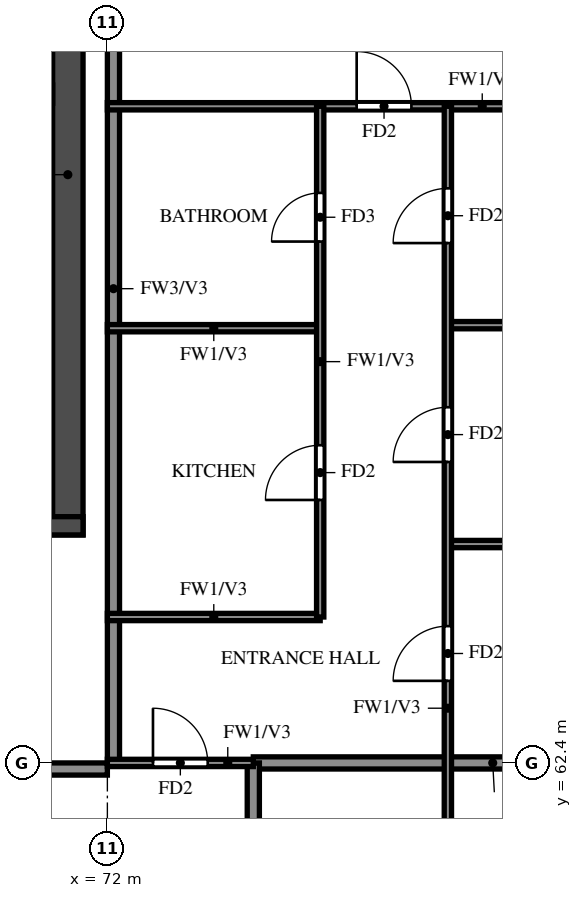
"""IFC4 building model, lengths in metres.
Left out: names, types, materials, properties, quantities, classifications, styles, units other than length and angle.
Written with IfcOpenShell. Run it as: python <this file> out.ifc"""

import sys

from ifc_helpers import new_model, si_unit, direction, frame, frame_2d, origin, place, context, subcontext, project, spatial, rectangle, extrude, element, fill, save


model = new_model("IFC4")
c1 = context("Model", 3, precision=1e-05, world=origin(), true_north=direction((0.0, 1.0)))
c2 = subcontext(c1, "Body", "Model", "MODEL_VIEW")
j1 = project(units=[si_unit("LENGTHUNIT", "METRE"), si_unit("PLANEANGLEUNIT", "RADIAN")], contexts=[c1])
p1 = place(None, origin())
s1 = spatial("IfcSite", under=j1, at=p1, CompositionType="ELEMENT")
p2 = place(p1, origin())
s2 = spatial("IfcBuilding", under=s1, at=p2, CompositionType="ELEMENT")
p3 = place(p2, frame((0.0, 0.0, 225.5)))
s3 = spatial("IfcBuildingStorey", under=s2, at=p3, CompositionType="ELEMENT", Elevation=225.5)
p4 = place(p3, frame((71.35, 66.15, 0.0), z_axis=(0.0, 0.0, 1.0), x_axis=(0.0, 1.0, 0.0)))
e1 = element("IfcWall", 1, at=p4, inside=s3, PredefinedType="SHEAR", context=c2, shape_type="SweptSolid", body=[
    extrude(rectangle(XDim=11.85, YDim=0.5, at=frame_2d((5.925, 0.0))), origin(), (0.0, 0.0, 1.0), 3.22),
])
p5 = place(p3, frame((29.2, 66.3, 0.0), z_axis=(0.0, 0.0, 1.0), x_axis=(1.0, 0.0, 0.0)))
e2 = element("IfcWall", 2, at=p5, inside=s3, PredefinedType="SHEAR", context=c2, shape_type="SweptSolid", body=[
    extrude(rectangle(XDim=42.4, YDim=0.3, at=frame_2d((21.2, 0.0))), origin(), (0.0, 0.0, 1.0), 3.22),
])
p6 = place(p5, frame((1.425, 0.0, 0.0)))
e3 = element("IfcOpeningElement", 3, at=p6, cuts=e2, PredefinedType="OPENING", context=c2, shape_type="SweptSolid", body=[
    extrude(rectangle(XDim=1.1, YDim=2.1, at=frame_2d((0.55, 1.05))), frame((0.0, 0.16, 0.0), z_axis=(0.0, -1.0, 0.0), x_axis=(1.0, 0.0, 0.0)), (0.0, 0.0, 1.0), 0.32),
])
p7 = place(p5, frame((4.2, 0.0, 0.0)))
e4 = element("IfcOpeningElement", 4, at=p7, cuts=e2, PredefinedType="OPENING", context=c2, shape_type="SweptSolid", body=[
    extrude(rectangle(XDim=1.8, YDim=2.1, at=frame_2d((0.9, 1.05))), frame((0.0, 0.16, 0.0), z_axis=(0.0, -1.0, 0.0), x_axis=(1.0, 0.0, 0.0)), (0.0, 0.0, 1.0), 0.32),
])
p8 = place(p3, frame((67.2, 62.3, 0.0), z_axis=(0.0, 0.0, 1.0), x_axis=(1.0, 0.0, 0.0)))
e5 = element("IfcWall", 5, at=p8, inside=s3, PredefinedType="SOLIDWALL", context=c2, shape_type="SweptSolid", body=[
    extrude(rectangle(XDim=4.8, YDim=0.2, at=frame_2d((2.4, 0.0))), origin(), (0.0, 0.0, 1.0), 3.22),
])
p9 = place(p3, frame((72.1, 62.4, 0.0), z_axis=(0.0, 0.0, 1.0), x_axis=(0.0, 1.0, 0.0)))
e6 = element("IfcWall", 6, at=p9, inside=s3, PredefinedType="SOLIDWALL", context=c2, shape_type="SweptSolid", body=[
    extrude(rectangle(XDim=15.6, YDim=0.2, at=frame_2d((7.8, 0.0))), origin(), (0.0, 0.0, 1.0), 3.22),
])
p10 = place(p3, frame((74.4, 62.4, 0.0), z_axis=(0.0, 0.0, 1.0), x_axis=(1.0, 0.0, 0.0)))
e7 = element("IfcWall", 7, at=p10, inside=s3, PredefinedType="SOLIDWALL", context=c2, shape_type="SweptSolid", body=[
    extrude(rectangle(XDim=7.875, YDim=0.2, at=frame_2d((3.938, 0.0))), origin(), (0.0, 0.0, 1.0), 3.22),
])
p11 = place(p3, frame((74.4, 60.0, 0.0), z_axis=(0.0, 0.0, 1.0), x_axis=(0.0, 1.0, 0.0)))
e8 = element("IfcWall", 8, at=p11, inside=s3, PredefinedType="SOLIDWALL", context=c2, shape_type="SweptSolid", body=[
    extrude(rectangle(XDim=2.4, YDim=0.2, at=frame_2d((1.2, 0.0))), origin(), (0.0, 0.0, 1.0), 3.22),
])
p12 = place(p3, frame((72.0, 62.4, 0.0), z_axis=(0.0, 0.0, 1.0), x_axis=(1.0, 0.0, 0.0)))
e9 = element("IfcWall", 9, at=p12, inside=s3, PredefinedType="PARTITIONING", context=c2, shape_type="SweptSolid", body=[
    extrude(rectangle(XDim=2.4, YDim=0.12, at=frame_2d((1.2, 0.0))), origin(), (0.0, 0.0, 1.0), 3.22),
])
p13 = place(p12, frame((0.75, 0.0, 0.0)))
e10 = element("IfcOpeningElement", 10, at=p13, cuts=e9, PredefinedType="OPENING", context=c2, shape_type="SweptSolid", body=[
    extrude(rectangle(XDim=0.9, YDim=2.1, at=frame_2d((0.45, 1.05))), frame((0.0, 0.07, 0.0), z_axis=(0.0, -1.0, 0.0), x_axis=(1.0, 0.0, 0.0)), (0.0, 0.0, 1.0), 0.14),
])
p14 = place(p3, frame((72.0, 64.8, 0.0), z_axis=(0.0, 0.0, 1.0), x_axis=(1.0, 0.0, 0.0)))
e11 = element("IfcWall", 11, at=p14, inside=s3, PredefinedType="PARTITIONING", context=c2, shape_type="SweptSolid", body=[
    extrude(rectangle(XDim=3.5, YDim=0.12, at=frame_2d((1.75, 0.0))), origin(), (0.0, 0.0, 1.0), 3.22),
])
p15 = place(p3, frame((77.6, 66.0, 0.0), z_axis=(0.0, 0.0, 1.0), x_axis=(1.0, 0.0, 0.0)))
e12 = element("IfcWall", 12, at=p15, inside=s3, PredefinedType="PARTITIONING", context=c2, shape_type="SweptSolid", body=[
    extrude(rectangle(XDim=4.675, YDim=0.12, at=frame_2d((2.337, 0.0))), origin(), (0.0, 0.0, 1.0), 2.32),
])
p16 = place(p3, frame((72.0, 69.55, 0.0), z_axis=(0.0, 0.0, 1.0), x_axis=(1.0, 0.0, 0.0)))
e13 = element("IfcWall", 13, at=p16, inside=s3, PredefinedType="PARTITIONING", context=c2, shape_type="SweptSolid", body=[
    extrude(rectangle(XDim=3.5, YDim=0.12, at=frame_2d((1.75, 0.0))), origin(), (0.0, 0.0, 1.0), 3.22),
])
p17 = place(p3, frame((77.6, 69.6, 0.0), z_axis=(0.0, 0.0, 1.0), x_axis=(1.0, 0.0, 0.0)))
e14 = element("IfcWall", 14, at=p17, inside=s3, PredefinedType="PARTITIONING", context=c2, shape_type="SweptSolid", body=[
    extrude(rectangle(XDim=4.675, YDim=0.12, at=frame_2d((2.337, 0.0))), origin(), (0.0, 0.0, 1.0), 3.22),
])
p18 = place(p3, frame((72.0, 73.2, 0.0), z_axis=(0.0, 0.0, 1.0), x_axis=(1.0, 0.0, 0.0)))
e15 = element("IfcWall", 15, at=p18, inside=s3, PredefinedType="PARTITIONING", context=c2, shape_type="SweptSolid", body=[
    extrude(rectangle(XDim=10.275, YDim=0.12, at=frame_2d((5.137, 0.0))), origin(), (0.0, 0.0, 1.0), 2.32),
])
p19 = place(p18, frame((4.1, 0.0, 0.0)))
e16 = element("IfcOpeningElement", 16, at=p19, cuts=e15, PredefinedType="OPENING", context=c2, shape_type="SweptSolid", body=[
    extrude(rectangle(XDim=0.9, YDim=2.1, at=frame_2d((0.45, 1.05))), frame((0.0, 0.07, 0.0), z_axis=(0.0, -1.0, 0.0), x_axis=(1.0, 0.0, 0.0)), (0.0, 0.0, 1.0), 0.14),
])
p20 = place(p3, frame((75.5, 64.8, 0.0), z_axis=(0.0, 0.0, 1.0), x_axis=(0.0, 1.0, 0.0)))
e17 = element("IfcWall", 17, at=p20, inside=s3, PredefinedType="PARTITIONING", context=c2, shape_type="SweptSolid", body=[
    extrude(rectangle(XDim=8.4, YDim=0.12, at=frame_2d((4.2, 0.0))), origin(), (0.0, 0.0, 1.0), 3.22),
])
p21 = place(p20, frame((1.925, 0.0, 0.0)))
e18 = element("IfcOpeningElement", 18, at=p21, cuts=e17, PredefinedType="OPENING", context=c2, shape_type="SweptSolid", body=[
    extrude(rectangle(XDim=0.9, YDim=2.1, at=frame_2d((0.45, 1.05))), frame((0.0, 0.07, 0.0), z_axis=(0.0, -1.0, 0.0), x_axis=(1.0, 0.0, 0.0)), (0.0, 0.0, 1.0), 0.14),
])
p22 = place(p20, frame((6.175, 0.0, 0.0)))
e19 = element("IfcOpeningElement", 19, at=p22, cuts=e17, PredefinedType="OPENING", context=c2, shape_type="SweptSolid", body=[
    extrude(rectangle(XDim=0.8, YDim=2.1, at=frame_2d((0.4, 1.05))), frame((0.0, 0.07, 0.0), z_axis=(0.0, -1.0, 0.0), x_axis=(1.0, 0.0, 0.0)), (0.0, 0.0, 1.0), 0.14),
])
p23 = place(p3, frame((77.6, 55.2, 0.0), z_axis=(0.0, 0.0, 1.0), x_axis=(0.0, 1.0, 0.0)))
e20 = element("IfcWall", 20, at=p23, inside=s3, PredefinedType="PARTITIONING", context=c2, shape_type="SweptSolid", body=[
    extrude(rectangle(XDim=18.0, YDim=0.12, at=frame_2d((9.0, 0.0))), origin(), (0.0, 0.0, 1.0), 3.22),
])
p24 = place(p23, frame((2.85, 0.0, 0.0)))
e21 = element("IfcOpeningElement", 21, at=p24, cuts=e20, PredefinedType="OPENING", context=c2, shape_type="SweptSolid", body=[
    extrude(rectangle(XDim=1.5, YDim=2.1, at=frame_2d((0.75, 1.05))), frame((0.0, 0.07, 0.0), z_axis=(0.0, -1.0, 0.0), x_axis=(1.0, 0.0, 0.0)), (0.0, 0.0, 1.0), 0.14),
])
p25 = place(p23, frame((8.55, 0.0, 0.0)))
e22 = element("IfcOpeningElement", 22, at=p25, cuts=e20, PredefinedType="OPENING", context=c2, shape_type="SweptSolid", body=[
    extrude(rectangle(XDim=0.9, YDim=2.1, at=frame_2d((0.45, 1.05))), frame((0.0, 0.07, 0.0), z_axis=(0.0, -1.0, 0.0), x_axis=(1.0, 0.0, 0.0)), (0.0, 0.0, 1.0), 0.14),
])
p26 = place(p23, frame((12.15, 0.0, 0.0)))
e23 = element("IfcOpeningElement", 23, at=p26, cuts=e20, PredefinedType="OPENING", context=c2, shape_type="SweptSolid", body=[
    extrude(rectangle(XDim=0.9, YDim=2.1, at=frame_2d((0.45, 1.05))), frame((0.0, 0.07, 0.0), z_axis=(0.0, -1.0, 0.0), x_axis=(1.0, 0.0, 0.0)), (0.0, 0.0, 1.0), 0.14),
])
p27 = place(p23, frame((15.75, 0.0, 0.0)))
e24 = element("IfcOpeningElement", 24, at=p27, cuts=e20, PredefinedType="OPENING", context=c2, shape_type="SweptSolid", body=[
    extrude(rectangle(XDim=0.9, YDim=2.1, at=frame_2d((0.45, 1.05))), frame((0.0, 0.07, 0.0), z_axis=(0.0, -1.0, 0.0), x_axis=(1.0, 0.0, 0.0)), (0.0, 0.0, 1.0), 0.14),
])
p28 = place(p13, origin())
e25 = element("IfcDoor", 25, at=p28, inside=s3, OperationType="SINGLE_SWING_LEFT", PredefinedType="DOOR", context=c2, shape_type="SweptSolid", body=[
    extrude(rectangle(XDim=0.9, YDim=2.1, at=frame_2d((0.45, 1.05))), frame((0.0, 0.025, 0.0), z_axis=(0.0, -1.0, 0.0), x_axis=(1.0, 0.0, 0.0)), (0.0, 0.0, 1.0), 0.05),
])
fill(e10, e25)
p29 = place(p25, origin())
e26 = element("IfcDoor", 26, at=p29, inside=s3, OperationType="SINGLE_SWING_RIGHT", PredefinedType="DOOR", context=c2, shape_type="SweptSolid", body=[
    extrude(rectangle(XDim=0.9, YDim=2.1, at=frame_2d((0.45, 1.05))), frame((0.0, 0.025, 0.0), z_axis=(0.0, -1.0, 0.0), x_axis=(1.0, 0.0, 0.0)), (0.0, 0.0, 1.0), 0.05),
])
fill(e22, e26)
p30 = place(p26, origin())
e27 = element("IfcDoor", 27, at=p30, inside=s3, OperationType="SINGLE_SWING_LEFT", PredefinedType="DOOR", context=c2, shape_type="SweptSolid", body=[
    extrude(rectangle(XDim=0.9, YDim=2.1, at=frame_2d((0.45, 1.05))), frame((0.0, 0.025, 0.0), z_axis=(0.0, -1.0, 0.0), x_axis=(1.0, 0.0, 0.0)), (0.0, 0.0, 1.0), 0.05),
])
fill(e23, e27)
p31 = place(p27, origin())
e28 = element("IfcDoor", 28, at=p31, inside=s3, OperationType="SINGLE_SWING_LEFT", PredefinedType="DOOR", context=c2, shape_type="SweptSolid", body=[
    extrude(rectangle(XDim=0.9, YDim=2.1, at=frame_2d((0.45, 1.05))), frame((0.0, 0.025, 0.0), z_axis=(0.0, -1.0, 0.0), x_axis=(1.0, 0.0, 0.0)), (0.0, 0.0, 1.0), 0.05),
])
fill(e24, e28)
p32 = place(p19, origin())
e29 = element("IfcDoor", 29, at=p32, inside=s3, OperationType="SINGLE_SWING_RIGHT", PredefinedType="DOOR", context=c2, shape_type="SweptSolid", body=[
    extrude(rectangle(XDim=0.9, YDim=2.1, at=frame_2d((0.45, 1.05))), frame((0.0, 0.025, 0.0), z_axis=(0.0, -1.0, 0.0), x_axis=(1.0, 0.0, 0.0)), (0.0, 0.0, 1.0), 0.05),
])
fill(e16, e29)
p33 = place(p21, origin())
e30 = element("IfcDoor", 30, at=p33, inside=s3, OperationType="SINGLE_SWING_LEFT", PredefinedType="DOOR", context=c2, shape_type="SweptSolid", body=[
    extrude(rectangle(XDim=0.9, YDim=2.1, at=frame_2d((0.45, 1.05))), frame((0.0, 0.025, 0.0), z_axis=(0.0, -1.0, 0.0), x_axis=(1.0, 0.0, 0.0)), (0.0, 0.0, 1.0), 0.05),
])
fill(e18, e30)
p34 = place(p22, origin())
e31 = element("IfcDoor", 31, at=p34, inside=s3, OperationType="SINGLE_SWING_LEFT", PredefinedType="DOOR", context=c2, shape_type="SweptSolid", body=[
    extrude(rectangle(XDim=0.8, YDim=2.1, at=frame_2d((0.4, 1.05))), frame((0.0, 0.025, 0.0), z_axis=(0.0, -1.0, 0.0), x_axis=(1.0, 0.0, 0.0)), (0.0, 0.0, 1.0), 0.05),
])
fill(e19, e31)
save(model, sys.argv[1])
